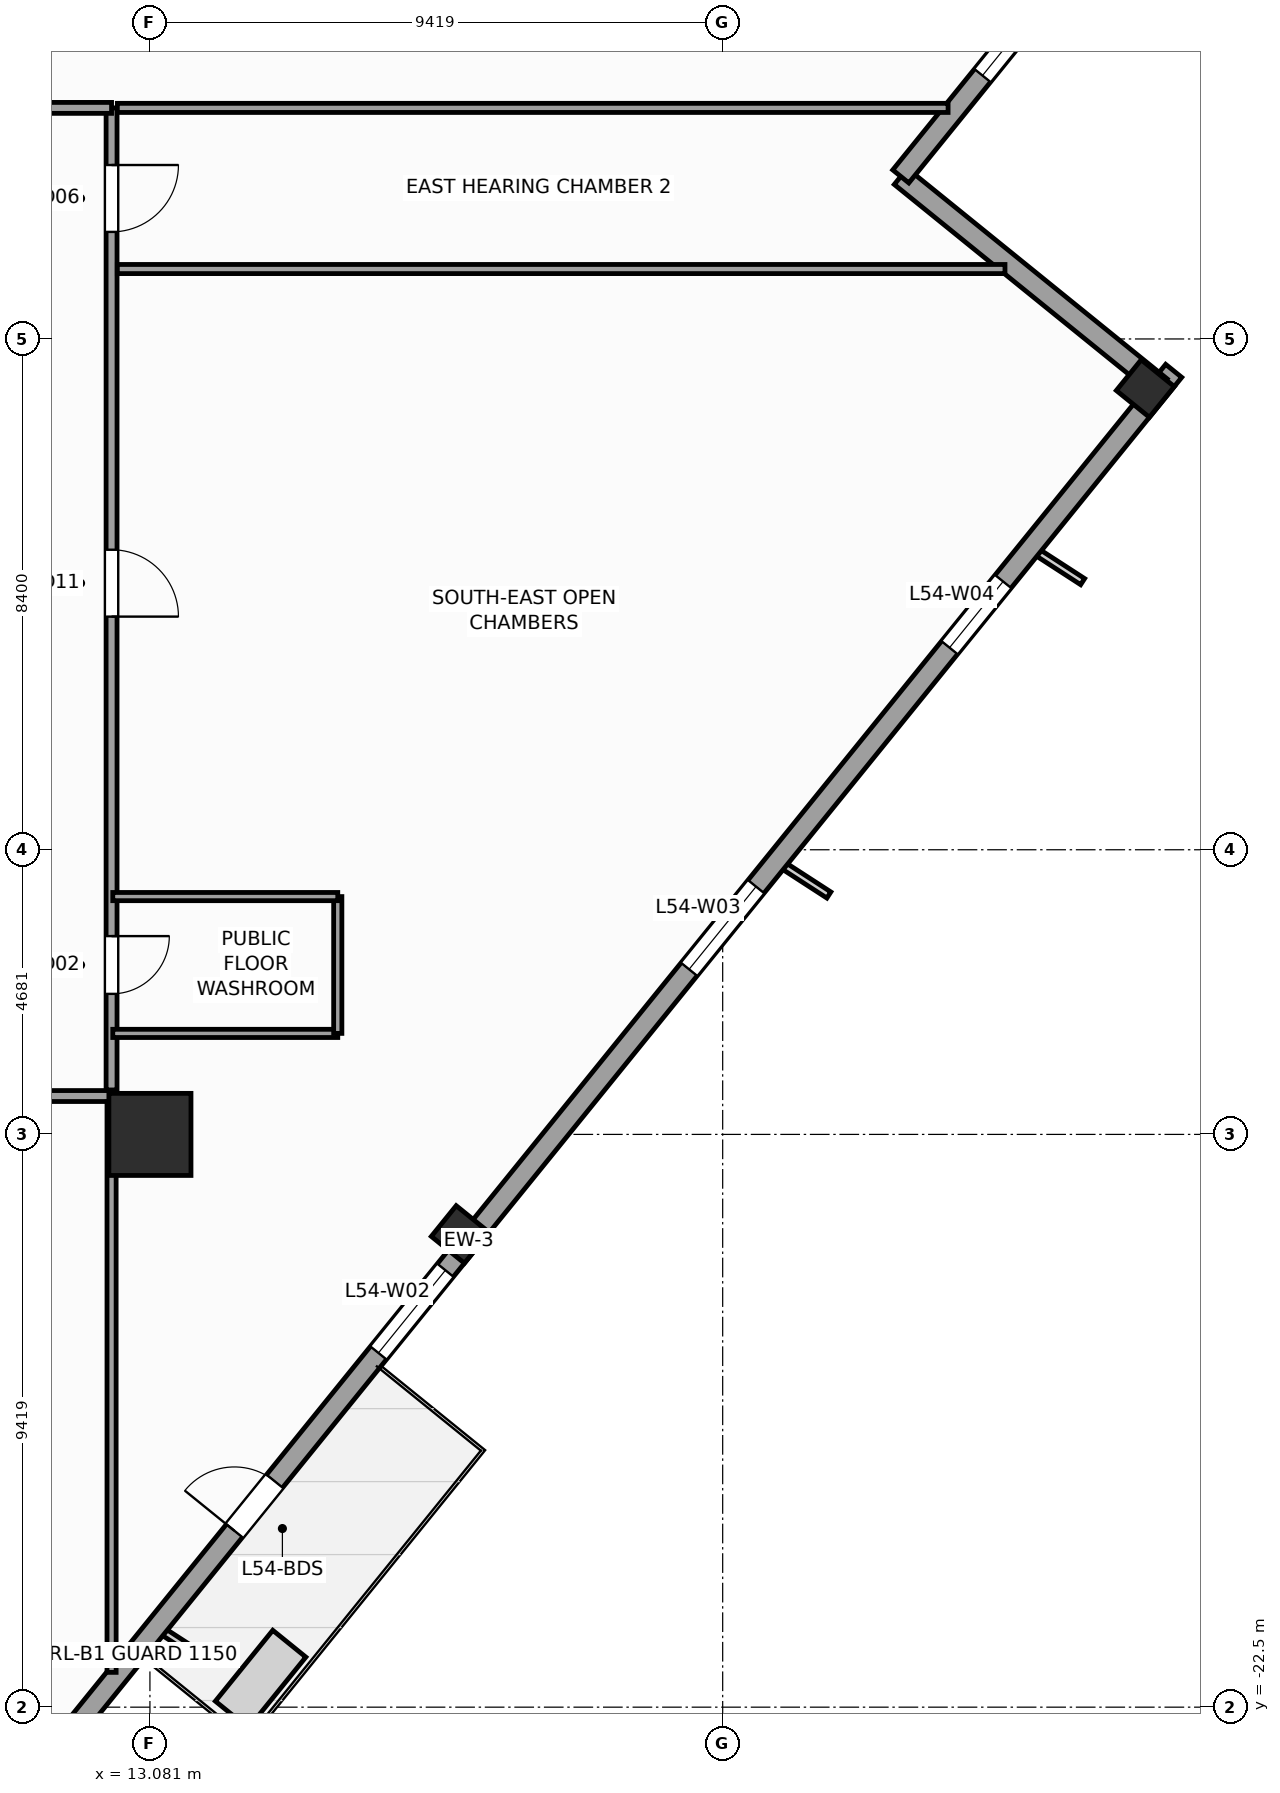
"""IFC4 building model, lengths in metres.
Left out: names, types, materials, properties, quantities, classifications, styles, units other than length and angle.
Written with IfcOpenShell. Run it as: python <this file> out.ifc"""

import sys

from ifc_helpers import new_model, si_unit, direction, frame, frame_2d, origin, origin_2d, place, context, subcontext, project, spatial, rectangle, extrude, source, transform, mapped, element, fill, save


model = new_model("IFC4")
c1 = context("Model", 3, precision=1e-05, world=origin(), true_north=direction((0.0, 1.0)))
c2 = subcontext(c1, "Body", "Model", "MODEL_VIEW")
j1 = project(units=[si_unit("LENGTHUNIT", "METRE"), si_unit("PLANEANGLEUNIT", "RADIAN")], contexts=[c1])
p1 = place(None, origin())
s1 = spatial("IfcSite", under=j1, at=p1, CompositionType="ELEMENT")
p2 = place(p1, origin())
s2 = spatial("IfcBuilding", under=s1, at=p2, CompositionType="ELEMENT")
p3 = place(p2, frame((0.0, 0.0, 225.1)))
s3 = spatial("IfcBuildingStorey", under=s2, at=p3, CompositionType="ELEMENT", Elevation=225.1)
m1 = source(origin(), c2, "Body", "SweptSolid", [
    extrude(rectangle(XDim=1.35, YDim=1.35, at=origin_2d()), origin(), (0.0, 0.0, 1.0), 3.9),
])
p4 = place(p3, frame((13.081, -13.081, 0.0), z_axis=(0.0, 0.0, 1.0), x_axis=(1.0, 0.0, 0.0)))
e1 = element("IfcColumn", 1, at=p4, inside=s3, PredefinedType="COLUMN", context=c2, shape_type="MappedRepresentation", body=[
    mapped(m1, transform((0.0, 0.0, 0.0), scale=1.0)),
])
m2 = source(origin(), c2, "Body", "SweptSolid", [
    extrude(rectangle(XDim=0.65, YDim=0.7, at=origin_2d()), origin(), (0.0, 0.0, 1.0), 3.9),
])
for number, where, z_axis, x_axis in (
    (2, (18.185, -14.726, 0.0), (0.0, 0.0, 1.0), (0.629, 0.777, 0.0)),
    (3, (29.45, -0.815, 0.0), (0.0, 0.0, 1.0), (0.629, 0.777, 0.0)),
):
    element("IfcColumn", number, at=place(p3, frame(where, z_axis=z_axis, x_axis=x_axis)), inside=s3, PredefinedType="COLUMN", context=c2, shape_type="MappedRepresentation", body=[
        mapped(m2, transform((0.0, 0.0, 0.0), scale=1.0)),
    ])
p5 = place(p3, frame((6.733, -29.154, 0.0), z_axis=(0.0, 0.0, 1.0), x_axis=(0.629325378072, 0.77714192302, 0.0)))
e4 = element("IfcWall", 4, at=p5, inside=s3, PredefinedType="STANDARD", context=c2, shape_type="SweptSolid", body=[
    extrude(rectangle(XDim=36.84, YDim=0.34, at=frame_2d((18.42, 0.0))), origin(), (0.0, 0.0, 1.0), 2.96),
])
p6 = place(p5, frame((12.295, 0.0, 0.0)))
e5 = element("IfcOpeningElement", 5, at=p6, cuts=e4, PredefinedType="OPENING", context=c2, shape_type="SweptSolid", body=[
    extrude(rectangle(XDim=1.05, YDim=2.25, at=frame_2d((0.525, 1.125))), frame((0.0, 0.18, 0.0), z_axis=(0.0, -1.0, 0.0), x_axis=(1.0, 0.0, 0.0)), (0.0, 0.0, 1.0), 0.36),
])
p7 = place(p5, frame((3.721, 0.0, 0.48)))
e6 = element("IfcOpeningElement", 6, at=p7, cuts=e4, PredefinedType="OPENING", context=c2, shape_type="SweptSolid", body=[
    extrude(rectangle(XDim=1.4, YDim=2.4, at=frame_2d((0.7, 1.2))), frame((0.0, 0.18, 0.0), z_axis=(0.0, -1.0, 0.0), x_axis=(1.0, 0.0, 0.0)), (0.0, 0.0, 1.0), 0.36),
])
p8 = place(p5, frame((16.058, 0.0, 0.58)))
e7 = element("IfcOpeningElement", 7, at=p8, cuts=e4, PredefinedType="OPENING", context=c2, shape_type="SweptSolid", body=[
    extrude(rectangle(XDim=1.75, YDim=2.3, at=frame_2d((0.875, 1.15))), frame((0.0, 0.18, 0.0), z_axis=(0.0, -1.0, 0.0), x_axis=(1.0, 0.0, 0.0)), (0.0, 0.0, 1.0), 0.36),
])
p9 = place(p5, frame((24.176, 0.0, 0.58)))
e8 = element("IfcOpeningElement", 8, at=p9, cuts=e4, PredefinedType="OPENING", context=c2, shape_type="SweptSolid", body=[
    extrude(rectangle(XDim=1.75, YDim=2.3, at=frame_2d((0.875, 1.15))), frame((0.0, 0.18, 0.0), z_axis=(0.0, -1.0, 0.0), x_axis=(1.0, 0.0, 0.0)), (0.0, 0.0, 1.0), 0.36),
])
p10 = place(p5, frame((30.982, 0.0, 0.48)))
e9 = element("IfcOpeningElement", 9, at=p10, cuts=e4, PredefinedType="OPENING", context=c2, shape_type="SweptSolid", body=[
    extrude(rectangle(XDim=1.4, YDim=2.4, at=frame_2d((0.7, 1.2))), frame((0.0, 0.18, 0.0), z_axis=(0.0, -1.0, 0.0), x_axis=(1.0, 0.0, 0.0)), (0.0, 0.0, 1.0), 0.36),
])
p11 = place(p3, frame((29.703, -0.789, 0.0), z_axis=(0.0, 0.0, 1.0), x_axis=(-0.77714355312, 0.629323365087, 0.0)))
e10 = element("IfcWall", 10, at=p11, inside=s3, PredefinedType="STANDARD", context=c2, shape_type="SweptSolid", body=[
    extrude(rectangle(XDim=5.5, YDim=0.34, at=frame_2d((2.75, 0.0))), origin(), (0.0, 0.0, 1.0), 3.66),
])
p12 = place(p3, frame((25.429, 2.673, 0.0), z_axis=(0.0, 0.0, 1.0), x_axis=(0.629299794138, 0.777162640055, 0.0)))
e11 = element("IfcWall", 11, at=p12, inside=s3, PredefinedType="STANDARD", context=c2, shape_type="SweptSolid", body=[
    extrude(rectangle(XDim=5.67, YDim=0.34, at=frame_2d((2.835, 0.0))), origin(), (0.0, 0.0, 1.0), 3.66),
])
p13 = place(p12, frame((2.135, 0.0, 0.48)))
e12 = element("IfcOpeningElement", 12, at=p13, cuts=e11, PredefinedType="OPENING", context=c2, shape_type="SweptSolid", body=[
    extrude(rectangle(XDim=1.4, YDim=2.4, at=frame_2d((0.7, 1.2))), frame((0.0, 0.18, 0.0), z_axis=(0.0, -1.0, 0.0), x_axis=(1.0, 0.0, 0.0)), (0.0, 0.0, 1.0), 0.36),
])
p14 = place(p3, frame((-12.45, -12.45, 0.0), z_axis=(0.0, 0.0, 1.0), x_axis=(1.0, 0.0, 0.0)))
e13 = element("IfcWall", 13, at=p14, inside=s3, PredefinedType="PARTITIONING", context=c2, shape_type="SweptSolid", body=[
    extrude(rectangle(XDim=24.9, YDim=0.18, at=frame_2d((12.45, 0.0))), origin(), (0.0, 0.0, 1.0), 3.66),
])
p15 = place(p14, frame((4.839, 0.0, 0.0)))
e14 = element("IfcOpeningElement", 14, at=p15, cuts=e13, PredefinedType="OPENING", context=c2, shape_type="SweptSolid", body=[
    extrude(rectangle(XDim=1.1, YDim=2.2, at=frame_2d((0.55, 1.1))), frame((0.0, 0.1, 0.0), z_axis=(0.0, -1.0, 0.0), x_axis=(1.0, 0.0, 0.0)), (0.0, 0.0, 1.0), 0.2),
])
p16 = place(p14, frame((13.15, 0.0, 0.0)))
e15 = element("IfcOpeningElement", 15, at=p16, cuts=e13, PredefinedType="OPENING", context=c2, shape_type="SweptSolid", body=[
    extrude(rectangle(XDim=1.1, YDim=2.2, at=frame_2d((0.55, 1.1))), frame((0.0, 0.1, 0.0), z_axis=(0.0, -1.0, 0.0), x_axis=(1.0, 0.0, 0.0)), (0.0, 0.0, 1.0), 0.2),
])
p17 = place(p14, frame((20.21, 0.0, 0.0)))
e16 = element("IfcOpeningElement", 16, at=p17, cuts=e13, PredefinedType="OPENING", context=c2, shape_type="SweptSolid", body=[
    extrude(rectangle(XDim=1.1, YDim=2.2, at=frame_2d((0.55, 1.1))), frame((0.0, 0.1, 0.0), z_axis=(0.0, -1.0, 0.0), x_axis=(1.0, 0.0, 0.0)), (0.0, 0.0, 1.0), 0.2),
])
p18 = place(p3, frame((12.45, -12.35, 0.0), z_axis=(0.0, 0.0, 1.0), x_axis=(0.0, 1.0, 0.0)))
e17 = element("IfcWall", 17, at=p18, inside=s3, PredefinedType="PARTITIONING", context=c2, shape_type="SweptSolid", body=[
    extrude(rectangle(XDim=16.15, YDim=0.18, at=frame_2d((8.075, 0.0))), origin(), (0.0, 0.0, 1.0), 3.66),
])
p19 = place(p18, frame((1.58, 0.0, 0.0)))
e18 = element("IfcOpeningElement", 18, at=p19, cuts=e17, PredefinedType="OPENING", context=c2, shape_type="SweptSolid", body=[
    extrude(rectangle(XDim=0.95, YDim=2.1, at=frame_2d((0.475, 1.05))), frame((0.0, 0.1, 0.0), z_axis=(0.0, -1.0, 0.0), x_axis=(1.0, 0.0, 0.0)), (0.0, 0.0, 1.0), 0.2),
])
p20 = place(p18, frame((14.111, 0.0, 0.0)))
e19 = element("IfcOpeningElement", 19, at=p20, cuts=e17, PredefinedType="OPENING", context=c2, shape_type="SweptSolid", body=[
    extrude(rectangle(XDim=1.1, YDim=2.2, at=frame_2d((0.55, 1.1))), frame((0.0, 0.1, 0.0), z_axis=(0.0, -1.0, 0.0), x_axis=(1.0, 0.0, 0.0)), (0.0, 0.0, 1.0), 0.2),
])
p21 = place(p18, frame((7.784, 0.0, 0.0)))
e20 = element("IfcOpeningElement", 20, at=p21, cuts=e17, PredefinedType="OPENING", context=c2, shape_type="SweptSolid", body=[
    extrude(rectangle(XDim=1.1, YDim=2.2, at=frame_2d((0.55, 1.1))), frame((0.0, 0.1, 0.0), z_axis=(0.0, -1.0, 0.0), x_axis=(1.0, 0.0, 0.0)), (0.0, 0.0, 1.0), 0.2),
])
p22 = place(p3, frame((8.55, 3.8, 0.0), z_axis=(0.0, 0.0, 1.0), x_axis=(1.0, 0.0, 0.0)))
e21 = element("IfcWall", 21, at=p22, inside=s3, PredefinedType="PARTITIONING", context=c2, shape_type="SweptSolid", body=[
    extrude(rectangle(XDim=3.9, YDim=0.18, at=frame_2d((1.95, 0.0))), origin(), (0.0, 0.0, 1.0), 3.66),
])
p23 = place(p22, frame((1.4, 0.0, 0.0)))
e22 = element("IfcOpeningElement", 22, at=p23, cuts=e21, PredefinedType="OPENING", context=c2, shape_type="SweptSolid", body=[
    extrude(rectangle(XDim=1.1, YDim=2.2, at=frame_2d((0.55, 1.1))), frame((0.0, 0.1, 0.0), z_axis=(0.0, -1.0, 0.0), x_axis=(1.0, 0.0, 0.0)), (0.0, 0.0, 1.0), 0.2),
])
p24 = place(p3, frame((12.545, 1.15, 0.0), z_axis=(0.0, 0.0, 1.0), x_axis=(1.0, 0.0, 0.0)))
e23 = element("IfcWall", 23, at=p24, inside=s3, PredefinedType="PARTITIONING", context=c2, shape_type="SweptSolid", body=[
    extrude(rectangle(XDim=14.597, YDim=0.15, at=frame_2d((7.299, 0.0))), origin(), (0.0, 0.0, 1.0), 3.66),
])
p25 = place(p3, frame((12.545, 3.8, 0.0), z_axis=(0.0, 0.0, 1.0), x_axis=(1.0, 0.0, 0.0)))
e24 = element("IfcWall", 24, at=p25, inside=s3, PredefinedType="PARTITIONING", context=c2, shape_type="SweptSolid", body=[
    extrude(rectangle(XDim=13.662, YDim=0.15, at=frame_2d((6.831, 0.0))), origin(), (0.0, 0.0, 1.0), 3.66),
])
p26 = place(p3, frame((12.45, -21.928, 0.0), z_axis=(0.0, 0.0, 1.0), x_axis=(0.0, 1.0, 0.0)))
e25 = element("IfcWall", 25, at=p26, inside=s3, PredefinedType="PARTITIONING", context=c2, shape_type="SweptSolid", body=[
    extrude(rectangle(XDim=9.383, YDim=0.15, at=frame_2d((4.691, 0.0))), origin(), (0.0, 0.0, 1.0), 2.96),
])
p27 = place(p3, frame((12.47, -11.42, 0.0), z_axis=(0.0, 0.0, 1.0), x_axis=(1.0, 0.0, 0.0)))
e26 = element("IfcWall", 26, at=p27, inside=s3, PredefinedType="PARTITIONING", context=c2, shape_type="SweptSolid", body=[
    extrude(rectangle(XDim=3.7, YDim=0.135, at=frame_2d((1.85, 0.0))), origin(), (0.0, 0.0, 1.0), 3.66),
])
p28 = place(p3, frame((16.17, -11.42, 0.0), z_axis=(0.0, 0.0, 1.0), x_axis=(0.0, 1.0, 0.0)))
e27 = element("IfcWall", 27, at=p28, inside=s3, PredefinedType="PARTITIONING", context=c2, shape_type="SweptSolid", body=[
    extrude(rectangle(XDim=2.25, YDim=0.135, at=frame_2d((1.125, 0.0))), origin(), (0.0, 0.0, 1.0), 3.66),
])
p29 = place(p3, frame((12.47, -9.17, 0.0), z_axis=(0.0, 0.0, 1.0), x_axis=(1.0, 0.0, 0.0)))
e28 = element("IfcWall", 28, at=p29, inside=s3, PredefinedType="PARTITIONING", context=c2, shape_type="SweptSolid", body=[
    extrude(rectangle(XDim=3.7, YDim=0.135, at=frame_2d((1.85, 0.0))), origin(), (0.0, 0.0, 1.0), 3.66),
])
m3 = source(origin(), c2, "Body", "SweptSolid", [
    extrude(rectangle(XDim=1.05, YDim=2.25, at=frame_2d((0.525, 1.125))), frame((0.0, 0.025, 0.0), z_axis=(0.0, -1.0, 0.0), x_axis=(1.0, 0.0, 0.0)), (0.0, 0.0, 1.0), 0.05),
])
p30 = place(p6, origin())
e29 = element("IfcDoor", 29, at=p30, inside=s3, OperationType="SINGLE_SWING_LEFT", PredefinedType="DOOR", context=c2, shape_type="MappedRepresentation", body=[
    mapped(m3, transform((0.0, 0.0, 0.0), scale=1.0)),
])
fill(e5, e29)
m4 = source(origin(), c2, "Body", "SweptSolid", [
    extrude(rectangle(XDim=1.75, YDim=2.3, at=frame_2d((0.875, 1.15))), frame((0.0, 0.03, 0.0), z_axis=(0.0, -1.0, 0.0), x_axis=(1.0, 0.0, 0.0)), (0.0, 0.0, 1.0), 0.06),
])
p31 = place(p8, origin())
e30 = element("IfcWindow", 30, at=p31, inside=s3, PartitioningType="SINGLE_PANEL", PredefinedType="WINDOW", context=c2, shape_type="MappedRepresentation", body=[
    mapped(m4, transform((0.0, 0.0, 0.0), scale=1.0)),
])
fill(e7, e30)
p32 = place(p9, origin())
e31 = element("IfcWindow", 31, at=p32, inside=s3, PartitioningType="SINGLE_PANEL", PredefinedType="WINDOW", context=c2, shape_type="MappedRepresentation", body=[
    mapped(m4, transform((0.0, 0.0, 0.0), scale=1.0)),
])
fill(e8, e31)
m5 = source(origin(), c2, "Body", "SweptSolid", [
    extrude(rectangle(XDim=1.4, YDim=2.4, at=frame_2d((0.7, 1.2))), frame((0.0, 0.03, 0.0), z_axis=(0.0, -1.0, 0.0), x_axis=(1.0, 0.0, 0.0)), (0.0, 0.0, 1.0), 0.06),
])
p33 = place(p10, origin())
e32 = element("IfcWindow", 32, at=p33, inside=s3, PartitioningType="SINGLE_PANEL", PredefinedType="WINDOW", context=c2, shape_type="MappedRepresentation", body=[
    mapped(m5, transform((0.0, 0.0, 0.0), scale=1.0)),
])
fill(e9, e32)
p34 = place(p13, origin())
e33 = element("IfcWindow", 33, at=p34, inside=s3, PartitioningType="SINGLE_PANEL", PredefinedType="WINDOW", context=c2, shape_type="MappedRepresentation", body=[
    mapped(m5, transform((0.0, 0.0, 0.0), scale=1.0)),
])
fill(e12, e33)
m6 = source(origin(), c2, "Body", "SweptSolid", [
    extrude(rectangle(XDim=0.95, YDim=2.1, at=frame_2d((0.475, 1.05))), frame((0.0, 0.025, 0.0), z_axis=(0.0, -1.0, 0.0), x_axis=(1.0, 0.0, 0.0)), (0.0, 0.0, 1.0), 0.05),
])
p35 = place(p19, frame((0.95, 0.0, 0.0), z_axis=(0.0, 0.0, 1.0), x_axis=(-1.0, 0.0, 0.0)))
e34 = element("IfcDoor", 34, at=p35, inside=s3, OperationType="SINGLE_SWING_RIGHT", PredefinedType="DOOR", context=c2, shape_type="MappedRepresentation", body=[
    mapped(m6, transform((0.0, 0.0, 0.0), scale=1.0)),
])
fill(e18, e34)
m7 = source(origin(), c2, "Body", "SweptSolid", [
    extrude(rectangle(XDim=1.1, YDim=2.2, at=frame_2d((0.55, 1.1))), frame((0.0, 0.025, 0.0), z_axis=(0.0, -1.0, 0.0), x_axis=(1.0, 0.0, 0.0)), (0.0, 0.0, 1.0), 0.05),
])
p36 = place(p20, frame((1.1, 0.0, 0.0), z_axis=(0.0, 0.0, 1.0), x_axis=(-1.0, 0.0, 0.0)))
e35 = element("IfcDoor", 35, at=p36, inside=s3, OperationType="SINGLE_SWING_RIGHT", PredefinedType="DOOR", context=c2, shape_type="MappedRepresentation", body=[
    mapped(m7, transform((0.0, 0.0, 0.0), scale=1.0)),
])
fill(e19, e35)
p37 = place(p21, frame((1.1, 0.0, 0.0), z_axis=(0.0, 0.0, 1.0), x_axis=(-1.0, 0.0, 0.0)))
e36 = element("IfcDoor", 36, at=p37, inside=s3, OperationType="SINGLE_SWING_LEFT", PredefinedType="DOOR", context=c2, shape_type="MappedRepresentation", body=[
    mapped(m7, transform((0.0, 0.0, 0.0), scale=1.0)),
])
fill(e20, e36)
save(model, sys.argv[1])
